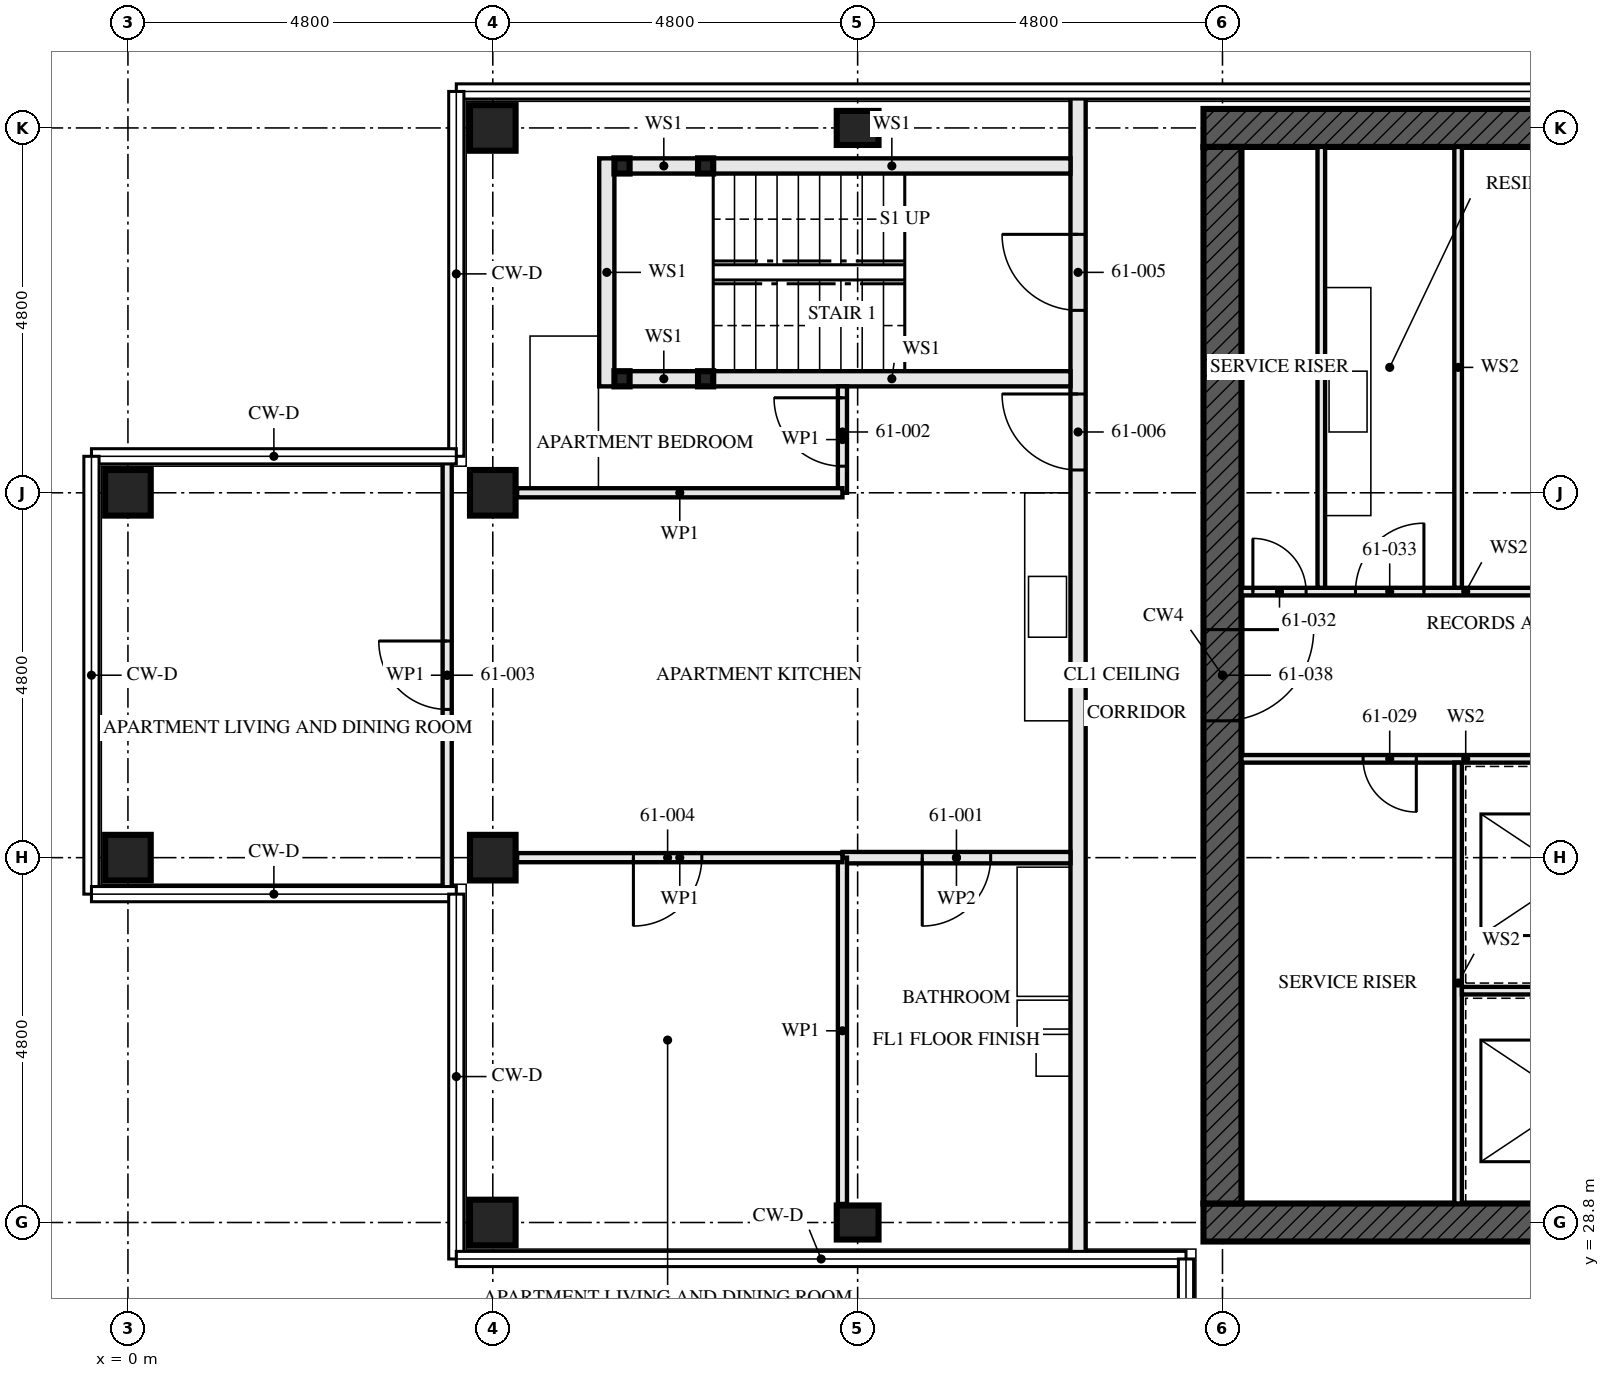
"""IFC4 building model, lengths in metres.
Left out: names, types, materials, properties, quantities, classifications, styles, units other than length and angle.
Written with IfcOpenShell. Run it as: python <this file> out.ifc"""

import sys

from ifc_helpers import new_model, si_unit, direction, frame, frame_2d, origin, origin_2d, place, context, subcontext, project, spatial, rectangle, hollow_rectangle, i_section, extrude, element, fill, save


model = new_model("IFC4")
c1 = context("Model", 3, precision=1e-05, world=origin(), true_north=direction((0.0, 1.0)))
c2 = subcontext(c1, "Body", "Model", "MODEL_VIEW")
j1 = project(units=[si_unit("LENGTHUNIT", "METRE"), si_unit("PLANEANGLEUNIT", "RADIAN")], contexts=[c1])
p1 = place(None, origin())
s1 = spatial("IfcSite", under=j1, at=p1, CompositionType="ELEMENT")
p2 = place(p1, origin())
s2 = spatial("IfcBuilding", under=s1, at=p2, CompositionType="ELEMENT")
p3 = place(p2, frame((0.0, 0.0, 222.5)))
s3 = spatial("IfcBuildingStorey", under=s2, at=p3, CompositionType="ELEMENT", Elevation=222.5)
for number, where, z_axis, x_axis in (
    (1, (0.0, 33.6, 0.0), (0.0, 0.0, 1.0), (0.0, 1.0, 0.0)),
    (2, (0.0, 38.4, 0.0), (0.0, 0.0, 1.0), (0.0, 1.0, 0.0)),
    (3, (4.8, 28.8, 0.0), (0.0, 0.0, 1.0), (0.0, 1.0, 0.0)),
    (4, (4.8, 33.6, 0.0), (0.0, 0.0, 1.0), (0.0, 1.0, 0.0)),
    (5, (4.8, 38.4, 0.0), (0.0, 0.0, 1.0), (0.0, 1.0, 0.0)),
    (6, (4.8, 43.2, 0.0), (0.0, 0.0, 1.0), (0.0, 1.0, 0.0)),
):
    element("IfcColumn", number, at=place(p3, frame(where, z_axis=z_axis, x_axis=x_axis)), inside=s3, PredefinedType="COLUMN", context=c2, shape_type="SweptSolid", body=[
        extrude(hollow_rectangle(XDim=0.6, YDim=0.6, WallThickness=0.05, at=origin_2d()), origin(), (0.0, 0.0, 1.0), 3.5),
    ])
for number, where, z_axis, x_axis in (
    (7, (9.6, 28.8, 0.0), (0.0, 0.0, 1.0), (0.0, 1.0, 0.0)),
    (8, (9.6, 43.2, 0.0), (0.0, 0.0, 1.0), (0.0, 1.0, 0.0)),
):
    element("IfcColumn", number, at=place(p3, frame(where, z_axis=z_axis, x_axis=x_axis)), inside=s3, PredefinedType="COLUMN", context=c2, shape_type="SweptSolid", body=[
        extrude(i_section(OverallWidth=0.448, OverallDepth=0.55, WebThickness=0.072, FlangeThickness=0.115, FilletRadius=0.015, at=origin_2d()), origin(), (0.0, 0.0, 1.0), 3.5),
    ])
p4 = place(p3, frame((14.15, 28.8, -0.17), z_axis=(0.0, 0.0, 1.0), x_axis=(1.0, 0.0, 0.0)))
e9 = element("IfcWall", 9, at=p4, inside=s3, PredefinedType="SHEAR", context=c2, shape_type="SweptSolid", body=[
    extrude(rectangle(XDim=14.9, YDim=0.5, at=frame_2d((7.45, 0.0))), origin(), (0.0, 0.0, 1.0), 3.5),
])
p5 = place(p4, frame((6.85, 0.0, 0.17)))
e10 = element("IfcOpeningElement", 10, at=p5, cuts=e9, PredefinedType="OPENING", context=c2, shape_type="SweptSolid", body=[
    extrude(rectangle(XDim=1.2, YDim=2.1, at=frame_2d((0.6, 1.05))), frame((0.0, 0.26, 0.0), z_axis=(0.0, -1.0, 0.0), x_axis=(1.0, 0.0, 0.0)), (0.0, 0.0, 1.0), 0.521),
])
p6 = place(p3, frame((29.05, 43.2, -0.17), z_axis=(0.0, 0.0, 1.0), x_axis=(-1.0, 0.0, 0.0)))
e11 = element("IfcWall", 11, at=p6, inside=s3, PredefinedType="SHEAR", context=c2, shape_type="SweptSolid", body=[
    extrude(rectangle(XDim=14.9, YDim=0.5, at=frame_2d((7.45, 0.0))), origin(), (0.0, 0.0, 1.0), 3.5),
])
p7 = place(p3, frame((14.4, 42.95, -0.17), z_axis=(0.0, 0.0, 1.0), x_axis=(0.0, -1.0, 0.0)))
e12 = element("IfcWall", 12, at=p7, inside=s3, PredefinedType="SHEAR", context=c2, shape_type="SweptSolid", body=[
    extrude(rectangle(XDim=13.9, YDim=0.5, at=frame_2d((6.95, 0.0))), origin(), (0.0, 0.0, 1.0), 3.5),
])
p8 = place(p7, frame((6.35, 0.0, 0.17)))
e13 = element("IfcOpeningElement", 13, at=p8, cuts=e12, PredefinedType="OPENING", context=c2, shape_type="SweptSolid", body=[
    extrude(rectangle(XDim=1.2, YDim=2.1, at=frame_2d((0.6, 1.05))), frame((0.0, 0.26, 0.0), z_axis=(0.0, -1.0, 0.0), x_axis=(1.0, 0.0, 0.0)), (0.0, 0.0, 1.0), 0.521),
])
for number, where, z_axis, x_axis in (
    (14, (6.5, 42.7, 0.0), (0.0, 0.0, 1.0), (1.0, 0.0, 0.0)),
    (15, (6.5, 39.9, 0.0), (0.0, 0.0, 1.0), (1.0, 0.0, 0.0)),
    (16, (7.6, 42.7, 0.0), (0.0, 0.0, 1.0), (1.0, 0.0, 0.0)),
    (17, (7.6, 39.9, 0.0), (0.0, 0.0, 1.0), (1.0, 0.0, 0.0)),
):
    element("IfcColumn", number, at=place(p3, frame(where, z_axis=z_axis, x_axis=x_axis)), inside=s3, PredefinedType="COLUMN", context=c2, shape_type="SweptSolid", body=[
        extrude(hollow_rectangle(XDim=0.2, YDim=0.2, WallThickness=0.008, at=origin_2d()), origin(), (0.0, 0.0, 1.0), 3.33),
    ])
p9 = place(p3, frame((6.6, 42.7, 0.0), z_axis=(0.0, 0.0, 1.0), x_axis=(1.0, 0.0, 0.0)))
e18 = element("IfcWall", 18, at=p9, inside=s3, PredefinedType="SOLIDWALL", context=c2, shape_type="SweptSolid", body=[
    extrude(rectangle(XDim=0.9, YDim=0.2, at=frame_2d((0.45, 0.0))), origin(), (0.0, 0.0, 1.0), 2.99),
])
p10 = place(p3, frame((7.7, 42.7, 0.0), z_axis=(0.0, 0.0, 1.0), x_axis=(1.0, 0.0, 0.0)))
e19 = element("IfcWall", 19, at=p10, inside=s3, PredefinedType="SOLIDWALL", context=c2, shape_type="SweptSolid", body=[
    extrude(rectangle(XDim=4.7, YDim=0.2, at=frame_2d((2.35, 0.0))), origin(), (0.0, 0.0, 1.0), 2.99),
])
p11 = place(p3, frame((6.6, 39.9, 0.0), z_axis=(0.0, 0.0, 1.0), x_axis=(1.0, 0.0, 0.0)))
e20 = element("IfcWall", 20, at=p11, inside=s3, PredefinedType="SOLIDWALL", context=c2, shape_type="SweptSolid", body=[
    extrude(rectangle(XDim=0.9, YDim=0.2, at=frame_2d((0.45, 0.0))), origin(), (0.0, 0.0, 1.0), 2.99),
])
p12 = place(p3, frame((7.7, 39.9, 0.0), z_axis=(0.0, 0.0, 1.0), x_axis=(1.0, 0.0, 0.0)))
e21 = element("IfcWall", 21, at=p12, inside=s3, PredefinedType="SOLIDWALL", context=c2, shape_type="SweptSolid", body=[
    extrude(rectangle(XDim=4.7, YDim=0.2, at=frame_2d((2.35, 0.0))), origin(), (0.0, 0.0, 1.0), 2.99),
])
p13 = place(p3, frame((6.3, 42.8, 0.0), z_axis=(0.0, 0.0, 1.0), x_axis=(0.0, -1.0, 0.0)))
e22 = element("IfcWall", 22, at=p13, inside=s3, PredefinedType="SOLIDWALL", context=c2, shape_type="SweptSolid", body=[
    extrude(rectangle(XDim=3.0, YDim=0.2, at=frame_2d((1.5, 0.0))), origin(), (0.0, 0.0, 1.0), 3.33),
])
p14 = place(p3, frame((9.4, 33.6, 0.0), z_axis=(0.0, 0.0, 1.0), x_axis=(1.0, 0.0, 0.0)))
e23 = element("IfcWall", 23, at=p14, inside=s3, PredefinedType="PARTITIONING", context=c2, shape_type="SweptSolid", body=[
    extrude(rectangle(XDim=3.0, YDim=0.15, at=frame_2d((1.5, 0.0))), origin(), (0.0, 0.0, 1.0), 2.55),
])
p15 = place(p14, frame((1.05, 0.0, 0.0)))
e24 = element("IfcOpeningElement", 24, at=p15, cuts=e23, PredefinedType="OPENING", context=c2, shape_type="SweptSolid", body=[
    extrude(rectangle(XDim=0.9, YDim=2.1, at=frame_2d((0.45, 1.05))), frame((0.0, 0.085, 0.0), z_axis=(0.0, -1.0, 0.0), x_axis=(1.0, 0.0, 0.0)), (0.0, 0.0, 1.0), 0.171),
])
p16 = place(p3, frame((9.4, 39.8, 0.0), z_axis=(0.0, 0.0, 1.0), x_axis=(0.0, -1.0, 0.0)))
e25 = element("IfcWall", 25, at=p16, inside=s3, PredefinedType="PARTITIONING", context=c2, shape_type="SweptSolid", body=[
    extrude(rectangle(XDim=1.4, YDim=0.12, at=frame_2d((0.7, 0.0))), origin(), (0.0, 0.0, 1.0), 3.33),
])
p17 = place(p16, frame((0.15, 0.0, 0.0)))
e26 = element("IfcOpeningElement", 26, at=p17, cuts=e25, PredefinedType="OPENING", context=c2, shape_type="SweptSolid", body=[
    extrude(rectangle(XDim=0.9, YDim=2.1, at=frame_2d((0.45, 1.05))), frame((0.0, 0.071, 0.0), z_axis=(0.0, -1.0, 0.0), x_axis=(1.0, 0.0, 0.0)), (0.0, 0.0, 1.0), 0.141),
])
p18 = place(p3, frame((4.2, 38.855, 0.0), z_axis=(0.0, 0.0, 1.0), x_axis=(0.0, -1.0, 0.0)))
e27 = element("IfcWall", 27, at=p18, inside=s3, PredefinedType="PARTITIONING", context=c2, shape_type="SweptSolid", body=[
    extrude(rectangle(XDim=5.71, YDim=0.12, at=frame_2d((2.855, 0.0))), origin(), (0.0, 0.0, 1.0), 2.32),
])
p19 = place(p18, frame((2.405, 0.0, 0.0)))
e28 = element("IfcOpeningElement", 28, at=p19, cuts=e27, PredefinedType="OPENING", context=c2, shape_type="SweptSolid", body=[
    extrude(rectangle(XDim=0.9, YDim=2.1, at=frame_2d((0.45, 1.05))), frame((0.0, 0.071, 0.0), z_axis=(0.0, -1.0, 0.0), x_axis=(1.0, 0.0, 0.0)), (0.0, 0.0, 1.0), 0.141),
])
p20 = place(p3, frame((9.4, 33.6, 0.0), z_axis=(0.0, 0.0, 1.0), x_axis=(0.0, -1.0, 0.0)))
e29 = element("IfcWall", 29, at=p20, inside=s3, PredefinedType="PARTITIONING", context=c2, shape_type="SweptSolid", body=[
    extrude(rectangle(XDim=4.556, YDim=0.12, at=frame_2d((2.278, 0.0))), origin(), (0.0, 0.0, 1.0), 3.33),
])
p21 = place(p3, frame((5.12, 38.4, 0.0), z_axis=(0.0, 0.0, 1.0), x_axis=(1.0, 0.0, 0.0)))
e30 = element("IfcWall", 30, at=p21, inside=s3, PredefinedType="PARTITIONING", context=c2, shape_type="SweptSolid", body=[
    extrude(rectangle(XDim=4.28, YDim=0.12, at=frame_2d((2.14, 0.0))), origin(), (0.0, 0.0, 1.0), 2.55),
])
p22 = place(p3, frame((5.12, 33.6, 0.0), z_axis=(0.0, 0.0, 1.0), x_axis=(1.0, 0.0, 0.0)))
e31 = element("IfcWall", 31, at=p22, inside=s3, PredefinedType="PARTITIONING", context=c2, shape_type="SweptSolid", body=[
    extrude(rectangle(XDim=4.28, YDim=0.12, at=frame_2d((2.14, 0.0))), origin(), (0.0, 0.0, 1.0), 2.55),
])
p23 = place(p22, frame((1.53, 0.0, 0.0)))
e32 = element("IfcOpeningElement", 32, at=p23, cuts=e31, PredefinedType="OPENING", context=c2, shape_type="SweptSolid", body=[
    extrude(rectangle(XDim=0.9, YDim=2.1, at=frame_2d((0.45, 1.05))), frame((0.0, 0.071, 0.0), z_axis=(0.0, -1.0, 0.0), x_axis=(1.0, 0.0, 0.0)), (0.0, 0.0, 1.0), 0.141),
])
p24 = place(p3, frame((12.5, 43.655, 0.0), z_axis=(0.0, 0.0, 1.0), x_axis=(0.0, -1.0, 0.0)))
e33 = element("IfcWall", 33, at=p24, inside=s3, PredefinedType="PARTITIONING", context=c2, shape_type="SweptSolid", body=[
    extrude(rectangle(XDim=15.31, YDim=0.2, at=frame_2d((7.655, 0.0))), origin(), (0.0, 0.0, 1.0), 2.32),
])
p25 = place(p24, frame((1.855, 0.0, 0.0)))
e34 = element("IfcOpeningElement", 34, at=p25, cuts=e33, PredefinedType="OPENING", context=c2, shape_type="SweptSolid", body=[
    extrude(rectangle(XDim=1.0, YDim=2.1, at=frame_2d((0.5, 1.05))), frame((0.0, 0.111, 0.0), z_axis=(0.0, -1.0, 0.0), x_axis=(1.0, 0.0, 0.0)), (0.0, 0.0, 1.0), 0.221),
])
p26 = place(p24, frame((3.955, 0.0, 0.0)))
e35 = element("IfcOpeningElement", 35, at=p26, cuts=e33, PredefinedType="OPENING", context=c2, shape_type="SweptSolid", body=[
    extrude(rectangle(XDim=1.0, YDim=2.1, at=frame_2d((0.5, 1.05))), frame((0.0, 0.111, 0.0), z_axis=(0.0, -1.0, 0.0), x_axis=(1.0, 0.0, 0.0)), (0.0, 0.0, 1.0), 0.221),
])
p27 = place(p3, frame((15.7, 37.15, 0.0), z_axis=(0.0, 0.0, 1.0), x_axis=(0.0, 1.0, 0.0)))
e36 = element("IfcWall", 36, at=p27, inside=s3, PredefinedType="SOLIDWALL", context=c2, shape_type="SweptSolid", body=[
    extrude(rectangle(XDim=5.8, YDim=0.1, at=frame_2d((2.9, 0.0))), origin(), (0.0, 0.0, 1.0), 3.33),
])
p28 = place(p3, frame((14.65, 34.9, 0.0), z_axis=(0.0, 0.0, 1.0), x_axis=(1.0, 0.0, 0.0)))
e37 = element("IfcWall", 37, at=p28, inside=s3, PredefinedType="SOLIDWALL", context=c2, shape_type="SweptSolid", body=[
    extrude(rectangle(XDim=5.9, YDim=0.1, at=frame_2d((2.95, 0.0))), origin(), (0.0, 0.0, 1.0), 3.33),
])
p29 = place(p28, frame((1.6, 0.0, 0.0)))
e38 = element("IfcOpeningElement", 38, at=p29, cuts=e37, PredefinedType="OPENING", context=c2, shape_type="SweptSolid", body=[
    extrude(rectangle(XDim=0.7, YDim=2.1, at=frame_2d((0.35, 1.05))), frame((0.0, 0.061, 0.0), z_axis=(0.0, -1.0, 0.0), x_axis=(1.0, 0.0, 0.0)), (0.0, 0.0, 1.0), 0.121),
])
p30 = place(p3, frame((14.65, 37.1, 0.0), z_axis=(0.0, 0.0, 1.0), x_axis=(1.0, 0.0, 0.0)))
e39 = element("IfcWall", 39, at=p30, inside=s3, PredefinedType="SOLIDWALL", context=c2, shape_type="SweptSolid", body=[
    extrude(rectangle(XDim=5.9, YDim=0.1, at=frame_2d((2.95, 0.0))), origin(), (0.0, 0.0, 1.0), 3.33),
])
p31 = place(p30, frame((0.15, 0.0, 0.0)))
e40 = element("IfcOpeningElement", 40, at=p31, cuts=e39, PredefinedType="OPENING", context=c2, shape_type="SweptSolid", body=[
    extrude(rectangle(XDim=0.7, YDim=2.1, at=frame_2d((0.35, 1.05))), frame((0.0, 0.061, 0.0), z_axis=(0.0, -1.0, 0.0), x_axis=(1.0, 0.0, 0.0)), (0.0, 0.0, 1.0), 0.121),
])
p32 = place(p30, frame((1.5, 0.0, 0.0)))
e41 = element("IfcOpeningElement", 41, at=p32, cuts=e39, PredefinedType="OPENING", context=c2, shape_type="SweptSolid", body=[
    extrude(rectangle(XDim=0.9, YDim=2.1, at=frame_2d((0.45, 1.05))), frame((0.0, 0.061, 0.0), z_axis=(0.0, -1.0, 0.0), x_axis=(1.0, 0.0, 0.0)), (0.0, 0.0, 1.0), 0.121),
])
p33 = place(p3, frame((17.5, 29.05, 0.0), z_axis=(0.0, 0.0, 1.0), x_axis=(0.0, 1.0, 0.0)))
e42 = element("IfcWall", 42, at=p33, inside=s3, PredefinedType="SOLIDWALL", context=c2, shape_type="SweptSolid", body=[
    extrude(rectangle(XDim=5.8, YDim=0.1, at=frame_2d((2.9, 0.0))), origin(), (0.0, 0.0, 1.0), 3.33),
])
p34 = place(p3, frame((17.55, 31.85, 0.0), z_axis=(0.0, 0.0, 1.0), x_axis=(1.0, 0.0, 0.0)))
e43 = element("IfcWall", 43, at=p34, inside=s3, PredefinedType="SOLIDWALL", context=c2, shape_type="SweptSolid", body=[
    extrude(rectangle(XDim=2.9, YDim=0.1, at=frame_2d((1.45, 0.0))), origin(), (0.0, 0.0, 1.0), 3.33),
])
p35 = place(p3, frame((17.5, 37.15, 0.0), z_axis=(0.0, 0.0, 1.0), x_axis=(0.0, 1.0, 0.0)))
e44 = element("IfcWall", 44, at=p35, inside=s3, PredefinedType="SOLIDWALL", context=c2, shape_type="SweptSolid", body=[
    extrude(rectangle(XDim=5.8, YDim=0.1, at=frame_2d((2.9, 0.0))), origin(), (0.0, 0.0, 1.0), 3.33),
])
p36 = place(p15, frame((0.9, 0.0, 0.0), z_axis=(0.0, 0.0, 1.0), x_axis=(-1.0, 0.0, 0.0)))
e45 = element("IfcDoor", 45, at=p36, inside=s3, OperationType="SINGLE_SWING_LEFT", PredefinedType="DOOR", context=c2, shape_type="SweptSolid", body=[
    extrude(rectangle(XDim=0.9, YDim=2.1, at=frame_2d((0.45, 1.05))), frame((0.0, 0.022, 0.0), z_axis=(0.0, -1.0, 0.0), x_axis=(1.0, 0.0, 0.0)), (0.0, 0.0, 1.0), 0.044),
])
fill(e24, e45)
p37 = place(p17, frame((0.9, 0.0, 0.0), z_axis=(0.0, 0.0, 1.0), x_axis=(-1.0, 0.0, 0.0)))
e46 = element("IfcDoor", 46, at=p37, inside=s3, OperationType="SINGLE_SWING_LEFT", PredefinedType="DOOR", context=c2, shape_type="SweptSolid", body=[
    extrude(rectangle(XDim=0.9, YDim=2.1, at=frame_2d((0.45, 1.05))), frame((0.0, 0.022, 0.0), z_axis=(0.0, -1.0, 0.0), x_axis=(1.0, 0.0, 0.0)), (0.0, 0.0, 1.0), 0.044),
])
fill(e26, e46)
p38 = place(p19, frame((0.9, 0.0, 0.0), z_axis=(0.0, 0.0, 1.0), x_axis=(-1.0, 0.0, 0.0)))
e47 = element("IfcDoor", 47, at=p38, inside=s3, OperationType="SINGLE_SWING_LEFT", PredefinedType="DOOR", context=c2, shape_type="SweptSolid", body=[
    extrude(rectangle(XDim=0.9, YDim=2.1, at=frame_2d((0.45, 1.05))), frame((0.0, 0.022, 0.0), z_axis=(0.0, -1.0, 0.0), x_axis=(1.0, 0.0, 0.0)), (0.0, 0.0, 1.0), 0.044),
])
fill(e28, e47)
p39 = place(p23, frame((0.9, 0.0, 0.0), z_axis=(0.0, 0.0, 1.0), x_axis=(-1.0, 0.0, 0.0)))
e48 = element("IfcDoor", 48, at=p39, inside=s3, OperationType="SINGLE_SWING_LEFT", PredefinedType="DOOR", context=c2, shape_type="SweptSolid", body=[
    extrude(rectangle(XDim=0.9, YDim=2.1, at=frame_2d((0.45, 1.05))), frame((0.0, 0.022, 0.0), z_axis=(0.0, -1.0, 0.0), x_axis=(1.0, 0.0, 0.0)), (0.0, 0.0, 1.0), 0.044),
])
fill(e32, e48)
p40 = place(p25, frame((1.0, 0.0, 0.0), z_axis=(0.0, 0.0, 1.0), x_axis=(-1.0, 0.0, 0.0)))
e49 = element("IfcDoor", 49, at=p40, inside=s3, OperationType="SINGLE_SWING_LEFT", PredefinedType="DOOR", context=c2, shape_type="SweptSolid", body=[
    extrude(rectangle(XDim=1.0, YDim=2.1, at=frame_2d((0.5, 1.05))), frame((0.0, 0.032, 0.0), z_axis=(0.0, -1.0, 0.0), x_axis=(1.0, 0.0, 0.0)), (0.0, 0.0, 1.0), 0.064),
])
fill(e34, e49)
p41 = place(p26, frame((1.0, 0.0, 0.0), z_axis=(0.0, 0.0, 1.0), x_axis=(-1.0, 0.0, 0.0)))
e50 = element("IfcDoor", 50, at=p41, inside=s3, OperationType="SINGLE_SWING_LEFT", PredefinedType="DOOR", context=c2, shape_type="SweptSolid", body=[
    extrude(rectangle(XDim=1.0, YDim=2.1, at=frame_2d((0.5, 1.05))), frame((0.0, 0.027, 0.0), z_axis=(0.0, -1.0, 0.0), x_axis=(1.0, 0.0, 0.0)), (0.0, 0.0, 1.0), 0.054),
])
fill(e35, e50)
p42 = place(p29, frame((0.7, 0.0, 0.0), z_axis=(0.0, 0.0, 1.0), x_axis=(-1.0, 0.0, 0.0)))
e51 = element("IfcDoor", 51, at=p42, inside=s3, OperationType="SINGLE_SWING_RIGHT", PredefinedType="DOOR", context=c2, shape_type="SweptSolid", body=[
    extrude(rectangle(XDim=0.7, YDim=2.1, at=frame_2d((0.35, 1.05))), frame((0.0, 0.027, 0.0), z_axis=(0.0, -1.0, 0.0), x_axis=(1.0, 0.0, 0.0)), (0.0, 0.0, 1.0), 0.054),
])
fill(e38, e51)
p43 = place(p31, origin())
e52 = element("IfcDoor", 52, at=p43, inside=s3, OperationType="SINGLE_SWING_RIGHT", PredefinedType="DOOR", context=c2, shape_type="SweptSolid", body=[
    extrude(rectangle(XDim=0.7, YDim=2.1, at=frame_2d((0.35, 1.05))), frame((0.0, 0.027, 0.0), z_axis=(0.0, -1.0, 0.0), x_axis=(1.0, 0.0, 0.0)), (0.0, 0.0, 1.0), 0.054),
])
fill(e40, e52)
p44 = place(p32, origin())
e53 = element("IfcDoor", 53, at=p44, inside=s3, OperationType="SINGLE_SWING_LEFT", PredefinedType="DOOR", context=c2, shape_type="SweptSolid", body=[
    extrude(rectangle(XDim=0.9, YDim=2.1, at=frame_2d((0.45, 1.05))), frame((0.0, 0.027, 0.0), z_axis=(0.0, -1.0, 0.0), x_axis=(1.0, 0.0, 0.0)), (0.0, 0.0, 1.0), 0.054),
])
fill(e41, e53)
p45 = place(p8, origin())
e54 = element("IfcDoor", 54, at=p45, inside=s3, OperationType="SINGLE_SWING_LEFT", PredefinedType="DOOR", context=c2, shape_type="SweptSolid", body=[
    extrude(rectangle(XDim=1.2, YDim=2.1, at=frame_2d((0.6, 1.05))), frame((0.0, 0.027, 0.0), z_axis=(0.0, -1.0, 0.0), x_axis=(1.0, 0.0, 0.0)), (0.0, 0.0, 1.0), 0.054),
])
fill(e13, e54)
save(model, sys.argv[1])
